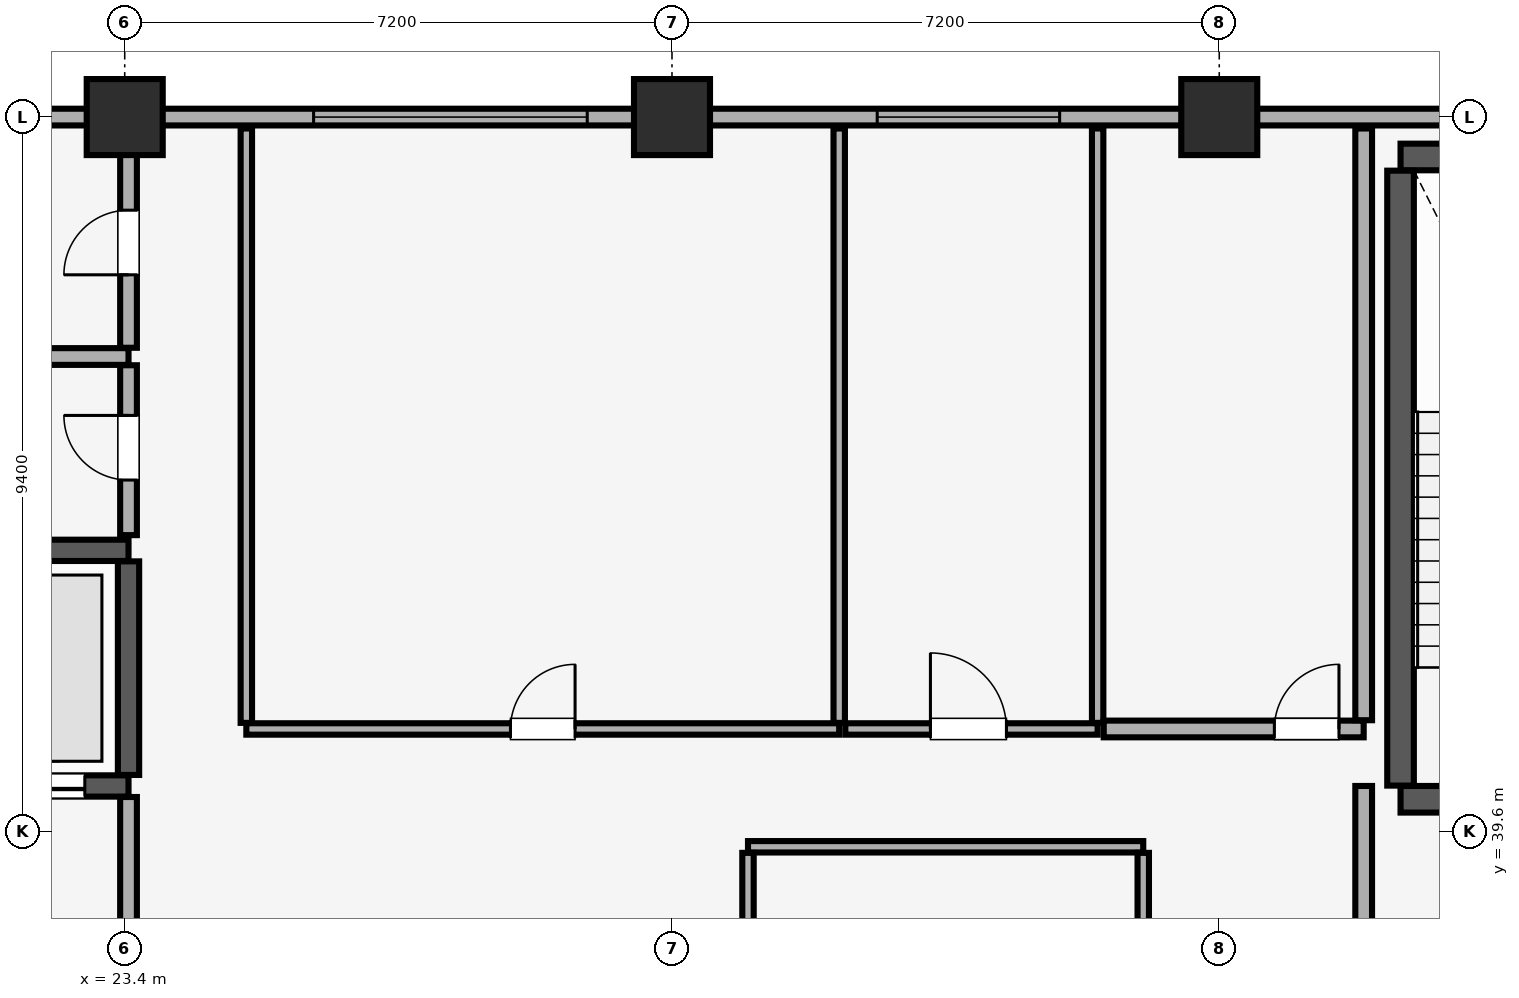
"""IFC4 building model, lengths in metres.
Left out: names, types, materials, properties, quantities, classifications, styles, units other than length and angle.
Written with IfcOpenShell. Run it as: python <this file> out.ifc"""

import sys

from ifc_helpers import new_model, si_unit, direction, frame, frame_2d, origin, origin_2d, place, context, subcontext, project, spatial, rectangle, extrude, element, fill, save


model = new_model("IFC4")
c1 = context("Model", 3, precision=1e-05, world=origin(), true_north=direction((0.0, 1.0)))
c2 = subcontext(c1, "Body", "Model", "MODEL_VIEW")
j1 = project(units=[si_unit("LENGTHUNIT", "METRE"), si_unit("PLANEANGLEUNIT", "RADIAN")], contexts=[c1])
p1 = place(None, origin())
s1 = spatial("IfcSite", under=j1, at=p1, CompositionType="ELEMENT")
p2 = place(p1, origin())
s2 = spatial("IfcBuilding", under=s1, at=p2, CompositionType="ELEMENT")
p3 = place(p2, frame((0.0, 0.0, 290.3)))
s3 = spatial("IfcBuildingStorey", under=s2, at=p3, CompositionType="ELEMENT", Elevation=290.3)
for number, where, z_axis, x_axis in (
    (1, (23.4, 49.0, 0.0), (0.0, 0.0, 1.0), (1.0, 0.0, 0.0)),
    (2, (30.6, 49.0, 0.0), (0.0, 0.0, 1.0), (1.0, 0.0, 0.0)),
    (3, (37.8, 49.0, 0.0), (0.0, 0.0, 1.0), (1.0, 0.0, 0.0)),
):
    element("IfcColumn", number, at=place(p3, frame(where, z_axis=z_axis, x_axis=x_axis)), inside=s3, PredefinedType="COLUMN", context=c2, shape_type="SweptSolid", body=[
        extrude(rectangle(XDim=1.0, YDim=1.0, at=origin_2d()), origin(), (0.0, 0.0, 1.0), 4.02),
    ])
p4 = place(p3, frame((71.4, 49.0, 0.0), z_axis=(0.0, 0.0, 1.0), x_axis=(-1.0, 0.0, 0.0)))
e4 = element("IfcWall", 4, at=p4, inside=s3, PredefinedType="SOLIDWALL", context=c2, shape_type="SweptSolid", body=[
    extrude(rectangle(XDim=58.8, YDim=0.22, at=frame_2d((29.4, 0.0))), origin(), (0.0, 0.0, 1.0), 3.22),
])
p5 = place(p4, frame((56.365, 0.0, 0.85)))
e5 = element("IfcOpeningElement", 5, at=p5, cuts=e4, PredefinedType="OPENING", context=c2, shape_type="SweptSolid", body=[
    extrude(rectangle(XDim=1.5, YDim=1.4, at=frame_2d((0.75, 0.7))), frame((0.0, 0.12, 0.0), z_axis=(0.0, -1.0, 0.0), x_axis=(1.0, 0.0, 0.0)), (0.0, 0.0, 1.0), 0.24),
])
p6 = place(p4, frame((0.935, 0.0, 0.85)))
e6 = element("IfcOpeningElement", 6, at=p6, cuts=e4, PredefinedType="OPENING", context=c2, shape_type="SweptSolid", body=[
    extrude(rectangle(XDim=1.5, YDim=1.4, at=frame_2d((0.75, 0.7))), frame((0.0, 0.12, 0.0), z_axis=(0.0, -1.0, 0.0), x_axis=(1.0, 0.0, 0.0)), (0.0, 0.0, 1.0), 0.24),
])
p7 = place(p4, frame((41.915, 0.0, 0.9)))
e7 = element("IfcOpeningElement", 7, at=p7, cuts=e4, PredefinedType="OPENING", context=c2, shape_type="SweptSolid", body=[
    extrude(rectangle(XDim=3.6, YDim=1.5, at=frame_2d((1.8, 0.75))), frame((0.0, 0.12, 0.0), z_axis=(0.0, -1.0, 0.0), x_axis=(1.0, 0.0, 0.0)), (0.0, 0.0, 1.0), 0.24),
])
p8 = place(p4, frame((35.7, 0.0, 0.9)))
e8 = element("IfcOpeningElement", 8, at=p8, cuts=e4, PredefinedType="OPENING", context=c2, shape_type="SweptSolid", body=[
    extrude(rectangle(XDim=2.4, YDim=1.5, at=frame_2d((1.2, 0.75))), frame((0.0, 0.12, 0.0), z_axis=(0.0, -1.0, 0.0), x_axis=(1.0, 0.0, 0.0)), (0.0, 0.0, 1.0), 0.24),
])
p9 = place(p4, frame((18.95, 0.0, 0.9)))
e9 = element("IfcOpeningElement", 9, at=p9, cuts=e4, PredefinedType="OPENING", context=c2, shape_type="SweptSolid", body=[
    extrude(rectangle(XDim=3.0, YDim=1.5, at=frame_2d((1.5, 0.75))), frame((0.0, 0.12, 0.0), z_axis=(0.0, -1.0, 0.0), x_axis=(1.0, 0.0, 0.0)), (0.0, 0.0, 1.0), 0.24),
])
p10 = place(p4, frame((14.635, 0.0, 0.9)))
e10 = element("IfcOpeningElement", 10, at=p10, cuts=e4, PredefinedType="OPENING", context=c2, shape_type="SweptSolid", body=[
    extrude(rectangle(XDim=2.4, YDim=1.5, at=frame_2d((1.2, 0.75))), frame((0.0, 0.12, 0.0), z_axis=(0.0, -1.0, 0.0), x_axis=(1.0, 0.0, 0.0)), (0.0, 0.0, 1.0), 0.24),
])
p11 = place(p3, frame((40.185, 40.025, 0.0), z_axis=(0.0, 0.0, 1.0), x_axis=(1.0, 0.0, 0.0)))
e11 = element("IfcWall", 11, at=p11, inside=s3, PredefinedType="SHEAR", context=c2, shape_type="SweptSolid", body=[
    extrude(rectangle(XDim=3.63, YDim=0.35, at=frame_2d((1.815, 0.0))), origin(), (0.0, 0.0, 1.0), 4.02),
])
p12 = place(p11, frame((1.24, 0.0, 0.0)))
e12 = element("IfcOpeningElement", 12, at=p12, cuts=e11, PredefinedType="OPENING", context=c2, shape_type="SweptSolid", body=[
    extrude(rectangle(XDim=1.15, YDim=2.15, at=frame_2d((0.575, 1.075))), frame((0.0, 0.185, 0.0), z_axis=(0.0, -1.0, 0.0), x_axis=(1.0, 0.0, 0.0)), (0.0, 0.0, 1.0), 0.37),
])
p13 = place(p3, frame((40.185, 48.475, 0.0), z_axis=(0.0, 0.0, 1.0), x_axis=(1.0, 0.0, 0.0)))
e13 = element("IfcWall", 13, at=p13, inside=s3, PredefinedType="SHEAR", context=c2, shape_type="SweptSolid", body=[
    extrude(rectangle(XDim=3.63, YDim=0.35, at=frame_2d((1.815, 0.0))), origin(), (0.0, 0.0, 1.0), 4.02),
])
p14 = place(p3, frame((40.185, 40.205, 0.0), z_axis=(0.0, 0.0, 1.0), x_axis=(0.0, 1.0, 0.0)))
e14 = element("IfcWall", 14, at=p14, inside=s3, PredefinedType="SHEAR", context=c2, shape_type="SweptSolid", body=[
    extrude(rectangle(XDim=8.09, YDim=0.35, at=frame_2d((4.045, 0.0))), origin(), (0.0, 0.0, 1.0), 4.02),
])
p15 = place(p3, frame((21.035, 40.2, 0.0), z_axis=(0.0, 0.0, 1.0), x_axis=(1.0, 0.0, 0.0)))
e15 = element("IfcWall", 15, at=p15, inside=s3, PredefinedType="SHEAR", context=c2, shape_type="SweptSolid", body=[
    extrude(rectangle(XDim=2.415, YDim=0.28, at=frame_2d((1.208, 0.0))), origin(), (0.0, 0.0, 1.0), 4.02),
])
p16 = place(p15, frame((0.54, 0.0, 0.0)))
e16 = element("IfcOpeningElement", 16, at=p16, cuts=e15, PredefinedType="OPENING", context=c2, shape_type="SweptSolid", body=[
    extrude(rectangle(XDim=1.3, YDim=2.3, at=frame_2d((0.65, 1.15))), frame((0.0, 0.15, 0.0), z_axis=(0.0, -1.0, 0.0), x_axis=(1.0, 0.0, 0.0)), (0.0, 0.0, 1.0), 0.3),
])
p17 = place(p3, frame((21.035, 43.3, 0.0), z_axis=(0.0, 0.0, 1.0), x_axis=(1.0, 0.0, 0.0)))
e17 = element("IfcWall", 17, at=p17, inside=s3, PredefinedType="SHEAR", context=c2, shape_type="SweptSolid", body=[
    extrude(rectangle(XDim=2.415, YDim=0.28, at=frame_2d((1.208, 0.0))), origin(), (0.0, 0.0, 1.0), 4.02),
])
p18 = place(p3, frame((23.45, 40.345, 0.0), z_axis=(0.0, 0.0, 1.0), x_axis=(0.0, 1.0, 0.0)))
e18 = element("IfcWall", 18, at=p18, inside=s3, PredefinedType="SHEAR", context=c2, shape_type="SweptSolid", body=[
    extrude(rectangle(XDim=2.81, YDim=0.28, at=frame_2d((1.405, 0.0))), origin(), (0.0, 0.0, 1.0), 4.02),
])
p19 = place(p3, frame((23.45, 34.415, 0.0), z_axis=(0.0, 0.0, 1.0), x_axis=(0.0, 1.0, 0.0)))
e19 = element("IfcWall", 19, at=p19, inside=s3, PredefinedType="PARTITIONING", context=c2, shape_type="SweptSolid", body=[
    extrude(rectangle(XDim=5.64, YDim=0.22, at=frame_2d((2.82, 0.0))), origin(), (0.0, 0.0, 1.0), 4.02),
])
p20 = place(p3, frame((39.7, 34.415, 0.0), z_axis=(0.0, 0.0, 1.0), x_axis=(0.0, 1.0, 0.0)))
e20 = element("IfcWall", 20, at=p20, inside=s3, PredefinedType="PARTITIONING", context=c2, shape_type="SweptSolid", body=[
    extrude(rectangle(XDim=5.785, YDim=0.22, at=frame_2d((2.893, 0.0))), origin(), (0.0, 0.0, 1.0), 4.02),
])
p21 = place(p3, frame((21.035, 45.85, 0.0), z_axis=(0.0, 0.0, 1.0), x_axis=(1.0, 0.0, 0.0)))
e21 = element("IfcWall", 21, at=p21, inside=s3, PredefinedType="PARTITIONING", context=c2, shape_type="SweptSolid", body=[
    extrude(rectangle(XDim=2.415, YDim=0.22, at=frame_2d((1.208, 0.0))), origin(), (0.0, 0.0, 1.0), 4.02),
])
p22 = place(p3, frame((23.45, 43.5, 0.0), z_axis=(0.0, 0.0, 1.0), x_axis=(0.0, 1.0, 0.0)))
e22 = element("IfcWall", 22, at=p22, inside=s3, PredefinedType="PARTITIONING", context=c2, shape_type="SweptSolid", body=[
    extrude(rectangle(XDim=2.235, YDim=0.22, at=frame_2d((1.118, 0.0))), origin(), (0.0, 0.0, 1.0), 4.02),
])
p23 = place(p22, frame((0.725, 0.0, 0.0)))
e23 = element("IfcOpeningElement", 23, at=p23, cuts=e22, PredefinedType="OPENING", context=c2, shape_type="SweptSolid", body=[
    extrude(rectangle(XDim=0.85, YDim=2.1, at=frame_2d((0.425, 1.05))), frame((0.0, 0.12, 0.0), z_axis=(0.0, -1.0, 0.0), x_axis=(1.0, 0.0, 0.0)), (0.0, 0.0, 1.0), 0.24),
])
p24 = place(p3, frame((23.45, 45.965, 0.0), z_axis=(0.0, 0.0, 1.0), x_axis=(0.0, 1.0, 0.0)))
e24 = element("IfcWall", 24, at=p24, inside=s3, PredefinedType="PARTITIONING", context=c2, shape_type="SweptSolid", body=[
    extrude(rectangle(XDim=2.885, YDim=0.22, at=frame_2d((1.442, 0.0))), origin(), (0.0, 0.0, 1.0), 4.02),
])
p25 = place(p24, frame((0.96, 0.0, 0.0)))
e25 = element("IfcOpeningElement", 25, at=p25, cuts=e24, PredefinedType="OPENING", context=c2, shape_type="SweptSolid", body=[
    extrude(rectangle(XDim=0.85, YDim=2.1, at=frame_2d((0.425, 1.05))), frame((0.0, 0.12, 0.0), z_axis=(0.0, -1.0, 0.0), x_axis=(1.0, 0.0, 0.0)), (0.0, 0.0, 1.0), 0.24),
])
p26 = place(p3, frame((31.6, 39.4, 0.0), z_axis=(0.0, 0.0, 1.0), x_axis=(1.0, 0.0, 0.0)))
e26 = element("IfcWall", 26, at=p26, inside=s3, PredefinedType="PARTITIONING", context=c2, shape_type="SweptSolid", body=[
    extrude(rectangle(XDim=5.2, YDim=0.15, at=frame_2d((2.6, 0.0))), origin(), (0.0, 0.0, 1.0), 4.02),
])
for number, where, z_axis, x_axis in (
    (27, (31.6, 34.38, 0.0), (0.0, 0.0, 1.0), (0.0, 1.0, 0.0)),
    (28, (36.8, 34.38, 0.0), (0.0, 0.0, 1.0), (0.0, 1.0, 0.0)),
):
    element("IfcWall", number, at=place(p3, frame(where, z_axis=z_axis, x_axis=x_axis)), inside=s3, PredefinedType="PARTITIONING", context=c2, shape_type="SweptSolid", body=[
        extrude(rectangle(XDim=4.94, YDim=0.15, at=frame_2d((2.47, 0.0))), origin(), (0.0, 0.0, 1.0), 4.02),
    ])
p27 = place(p3, frame((25.0, 40.95, 0.0), z_axis=(0.0, 0.0, 1.0), x_axis=(1.0, 0.0, 0.0)))
e29 = element("IfcWall", 29, at=p27, inside=s3, PredefinedType="PARTITIONING", context=c2, shape_type="SweptSolid", body=[
    extrude(rectangle(XDim=7.8, YDim=0.15, at=frame_2d((3.9, 0.0))), origin(), (0.0, 0.0, 1.0), 4.02),
])
p28 = place(p27, frame((3.475, 0.0, 0.0)))
e30 = element("IfcOpeningElement", 30, at=p28, cuts=e29, PredefinedType="OPENING", context=c2, shape_type="SweptSolid", body=[
    extrude(rectangle(XDim=0.85, YDim=2.1, at=frame_2d((0.425, 1.05))), frame((0.0, 0.085, 0.0), z_axis=(0.0, -1.0, 0.0), x_axis=(1.0, 0.0, 0.0)), (0.0, 0.0, 1.0), 0.17),
])
for number, where, z_axis, x_axis in (
    (31, (25.0, 41.03, 0.0), (0.0, 0.0, 1.0), (0.0, 1.0, 0.0)),
    (32, (32.8, 41.03, 0.0), (0.0, 0.0, 1.0), (0.0, 1.0, 0.0)),
):
    element("IfcWall", number, at=place(p3, frame(where, z_axis=z_axis, x_axis=x_axis)), inside=s3, PredefinedType="PARTITIONING", context=c2, shape_type="SweptSolid", body=[
        extrude(rectangle(XDim=7.82, YDim=0.15, at=frame_2d((3.91, 0.0))), origin(), (0.0, 0.0, 1.0), 4.02),
    ])
p29 = place(p3, frame((32.88, 40.95, 0.0), z_axis=(0.0, 0.0, 1.0), x_axis=(1.0, 0.0, 0.0)))
e33 = element("IfcWall", 33, at=p29, inside=s3, PredefinedType="PARTITIONING", context=c2, shape_type="SweptSolid", body=[
    extrude(rectangle(XDim=3.32, YDim=0.15, at=frame_2d((1.66, 0.0))), origin(), (0.0, 0.0, 1.0), 4.02),
])
p30 = place(p29, frame((1.12, 0.0, 0.0)))
e34 = element("IfcOpeningElement", 34, at=p30, cuts=e33, PredefinedType="OPENING", context=c2, shape_type="SweptSolid", body=[
    extrude(rectangle(XDim=1.0, YDim=2.15, at=frame_2d((0.5, 1.075))), frame((0.0, 0.085, 0.0), z_axis=(0.0, -1.0, 0.0), x_axis=(1.0, 0.0, 0.0)), (0.0, 0.0, 1.0), 0.17),
])
p31 = place(p3, frame((36.2, 41.03, 0.0), z_axis=(0.0, 0.0, 1.0), x_axis=(0.0, 1.0, 0.0)))
e35 = element("IfcWall", 35, at=p31, inside=s3, PredefinedType="PARTITIONING", context=c2, shape_type="SweptSolid", body=[
    extrude(rectangle(XDim=7.82, YDim=0.15, at=frame_2d((3.91, 0.0))), origin(), (0.0, 0.0, 1.0), 4.02),
])
p32 = place(p3, frame((36.28, 40.95, 0.0), z_axis=(0.0, 0.0, 1.0), x_axis=(1.0, 0.0, 0.0)))
e36 = element("IfcWall", 36, at=p32, inside=s3, PredefinedType="PARTITIONING", context=c2, shape_type="SweptSolid", body=[
    extrude(rectangle(XDim=3.42, YDim=0.22, at=frame_2d((1.71, 0.0))), origin(), (0.0, 0.0, 1.0), 4.02),
])
p33 = place(p32, frame((2.245, 0.0, 0.0)))
e37 = element("IfcOpeningElement", 37, at=p33, cuts=e36, PredefinedType="OPENING", context=c2, shape_type="SweptSolid", body=[
    extrude(rectangle(XDim=0.85, YDim=2.1, at=frame_2d((0.425, 1.05))), frame((0.0, 0.12, 0.0), z_axis=(0.0, -1.0, 0.0), x_axis=(1.0, 0.0, 0.0)), (0.0, 0.0, 1.0), 0.24),
])
p34 = place(p3, frame((39.7, 41.065, 0.0), z_axis=(0.0, 0.0, 1.0), x_axis=(0.0, 1.0, 0.0)))
e38 = element("IfcWall", 38, at=p34, inside=s3, PredefinedType="PARTITIONING", context=c2, shape_type="SweptSolid", body=[
    extrude(rectangle(XDim=7.785, YDim=0.22, at=frame_2d((3.893, 0.0))), origin(), (0.0, 0.0, 1.0), 4.02),
])
p35 = place(p7, origin())
e39 = element("IfcWindow", 39, at=p35, inside=s3, PartitioningType="SINGLE_PANEL", PredefinedType="WINDOW", context=c2, shape_type="SweptSolid", body=[
    extrude(rectangle(XDim=3.6, YDim=1.5, at=frame_2d((1.8, 0.75))), frame((0.0, 0.03, 0.0), z_axis=(0.0, -1.0, 0.0), x_axis=(1.0, 0.0, 0.0)), (0.0, 0.0, 1.0), 0.06),
])
fill(e7, e39)
p36 = place(p8, origin())
e40 = element("IfcWindow", 40, at=p36, inside=s3, PartitioningType="SINGLE_PANEL", PredefinedType="WINDOW", context=c2, shape_type="SweptSolid", body=[
    extrude(rectangle(XDim=2.4, YDim=1.5, at=frame_2d((1.2, 0.75))), frame((0.0, 0.03, 0.0), z_axis=(0.0, -1.0, 0.0), x_axis=(1.0, 0.0, 0.0)), (0.0, 0.0, 1.0), 0.06),
])
fill(e8, e40)
p37 = place(p16, origin())
e41 = element("IfcDoor", 41, at=p37, inside=s3, OperationType="DOUBLE_DOOR_SLIDING", PredefinedType="DOOR", context=c2, shape_type="SweptSolid", body=[
    extrude(rectangle(XDim=1.3, YDim=2.3, at=frame_2d((0.65, 1.15))), frame((0.0, 0.025, 0.0), z_axis=(0.0, -1.0, 0.0), x_axis=(1.0, 0.0, 0.0)), (0.0, 0.0, 1.0), 0.05),
])
fill(e16, e41)
p38 = place(p23, origin())
e42 = element("IfcDoor", 42, at=p38, inside=s3, OperationType="SINGLE_SWING_RIGHT", PredefinedType="DOOR", context=c2, shape_type="SweptSolid", body=[
    extrude(rectangle(XDim=0.85, YDim=2.1, at=frame_2d((0.425, 1.05))), frame((0.0, 0.025, 0.0), z_axis=(0.0, -1.0, 0.0), x_axis=(1.0, 0.0, 0.0)), (0.0, 0.0, 1.0), 0.05),
])
fill(e23, e42)
p39 = place(p25, origin())
e43 = element("IfcDoor", 43, at=p39, inside=s3, OperationType="SINGLE_SWING_LEFT", PredefinedType="DOOR", context=c2, shape_type="SweptSolid", body=[
    extrude(rectangle(XDim=0.85, YDim=2.1, at=frame_2d((0.425, 1.05))), frame((0.0, 0.025, 0.0), z_axis=(0.0, -1.0, 0.0), x_axis=(1.0, 0.0, 0.0)), (0.0, 0.0, 1.0), 0.05),
])
fill(e25, e43)
p40 = place(p28, origin())
e44 = element("IfcDoor", 44, at=p40, inside=s3, OperationType="SINGLE_SWING_RIGHT", PredefinedType="DOOR", context=c2, shape_type="SweptSolid", body=[
    extrude(rectangle(XDim=0.85, YDim=2.1, at=frame_2d((0.425, 1.05))), frame((0.0, 0.025, 0.0), z_axis=(0.0, -1.0, 0.0), x_axis=(1.0, 0.0, 0.0)), (0.0, 0.0, 1.0), 0.05),
])
fill(e30, e44)
p41 = place(p30, origin())
e45 = element("IfcDoor", 45, at=p41, inside=s3, OperationType="SINGLE_SWING_LEFT", PredefinedType="DOOR", context=c2, shape_type="SweptSolid", body=[
    extrude(rectangle(XDim=1.0, YDim=2.15, at=frame_2d((0.5, 1.075))), frame((0.0, 0.025, 0.0), z_axis=(0.0, -1.0, 0.0), x_axis=(1.0, 0.0, 0.0)), (0.0, 0.0, 1.0), 0.05),
])
fill(e34, e45)
p42 = place(p33, origin())
e46 = element("IfcDoor", 46, at=p42, inside=s3, OperationType="SINGLE_SWING_RIGHT", PredefinedType="DOOR", context=c2, shape_type="SweptSolid", body=[
    extrude(rectangle(XDim=0.85, YDim=2.1, at=frame_2d((0.425, 1.05))), frame((0.0, 0.025, 0.0), z_axis=(0.0, -1.0, 0.0), x_axis=(1.0, 0.0, 0.0)), (0.0, 0.0, 1.0), 0.05),
])
fill(e37, e46)
save(model, sys.argv[1])
